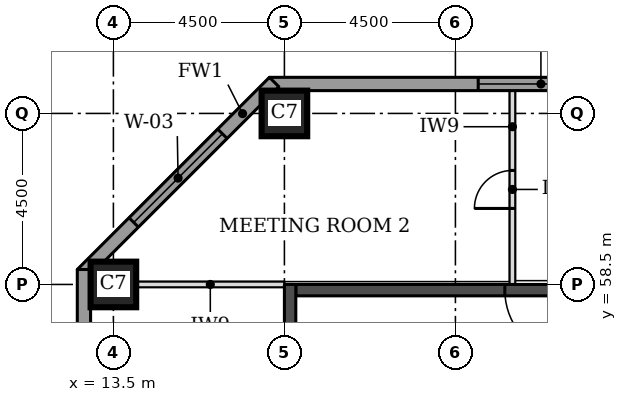
"""IFC4 building model, lengths in metres.
Left out: names, types, materials, properties, quantities, classifications, styles, units other than length and angle.
Written with IfcOpenShell. Run it as: python <this file> out.ifc"""

import sys

from ifc_helpers import new_model, si_unit, direction, frame, frame_2d, origin, origin_2d, place, context, subcontext, project, spatial, rectangle, extrude, element, fill, save


model = new_model("IFC4")
c1 = context("Model", 3, precision=1e-05, world=origin(), true_north=direction((0.0, 1.0)))
c2 = subcontext(c1, "Body", "Model", "MODEL_VIEW")
j1 = project(units=[si_unit("LENGTHUNIT", "METRE"), si_unit("PLANEANGLEUNIT", "RADIAN")], contexts=[c1])
p1 = place(None, origin())
s1 = spatial("IfcSite", under=j1, at=p1, CompositionType="ELEMENT")
p2 = place(p1, origin())
s2 = spatial("IfcBuilding", under=s1, at=p2, CompositionType="ELEMENT")
p3 = place(p2, frame((0.0, 0.0, 18.5)))
s3 = spatial("IfcBuildingStorey", under=s2, at=p3, CompositionType="ELEMENT", Elevation=18.5)
for number, where, z_axis, x_axis in (
    (1, (13.5, 58.5, 0.0), (0.0, 0.0, 1.0), (1.0, 0.0, 0.0)),
    (2, (18.0, 63.0, 0.0), (0.0, 0.0, 1.0), (1.0, 0.0, 0.0)),
):
    element("IfcColumn", number, at=place(p3, frame(where, z_axis=z_axis, x_axis=x_axis)), inside=s3, PredefinedType="COLUMN", context=c2, shape_type="SweptSolid", body=[
        extrude(rectangle(XDim=1.2, YDim=1.2, at=origin_2d()), origin(), (0.0, 0.0, 1.0), 4.6),
    ])
p4 = place(p3, frame((18.3, 58.35, 0.0), z_axis=(0.0, 0.0, 1.0), x_axis=(1.0, 0.0, 0.0)))
e3 = element("IfcWall", 3, at=p4, inside=s3, PredefinedType="SHEAR", context=c2, shape_type="SweptSolid", body=[
    extrude(rectangle(XDim=8.4, YDim=0.3, at=frame_2d((4.2, 0.0))), origin(), (0.0, 0.0, 1.0), 4.6),
])
p5 = place(p4, frame((5.5, 0.0, 0.0)))
e4 = element("IfcOpeningElement", 4, at=p5, cuts=e3, PredefinedType="OPENING", context=c2, shape_type="SweptSolid", body=[
    extrude(rectangle(XDim=1.8, YDim=2.1, at=frame_2d((0.9, 1.05))), frame((0.0, 0.16, 0.0), z_axis=(0.0, -1.0, 0.0), x_axis=(1.0, 0.0, 0.0)), (0.0, 0.0, 1.0), 0.32),
])
p6 = place(p3, frame((18.15, 49.5, 0.0), z_axis=(0.0, 0.0, 1.0), x_axis=(0.0, 1.0, 0.0)))
e5 = element("IfcWall", 5, at=p6, inside=s3, PredefinedType="SHEAR", context=c2, shape_type="SweptSolid", body=[
    extrude(rectangle(XDim=9.0, YDim=0.3, at=frame_2d((4.5, 0.0))), origin(), (0.0, 0.0, 1.0), 4.6),
])
p7 = place(p3, frame((35.4, 63.775, 0.0), z_axis=(0.0, 0.0, 1.0), x_axis=(-1.0, 0.0, 0.0)))
e6 = element("IfcWall", 6, at=p7, inside=s3, PredefinedType="STANDARD", context=c2, shape_type="SweptSolid", body=[
    extrude(rectangle(XDim=17.793, YDim=0.35, at=frame_2d((8.897, 0.0))), origin(), (0.0, 0.0, 1.0), 4.355),
])
p8 = place(p7, frame((0.5, 0.0, 0.9)))
e7 = element("IfcOpeningElement", 7, at=p8, cuts=e6, PredefinedType="OPENING", context=c2, shape_type="SweptSolid", body=[
    extrude(rectangle(XDim=3.3, YDim=2.7, at=frame_2d((1.65, 1.35))), frame((0.0, 0.185, 0.0), z_axis=(0.0, -1.0, 0.0), x_axis=(1.0, 0.0, 0.0)), (0.0, 0.0, 1.0), 0.37),
])
p9 = place(p7, frame((9.0, 0.0, 0.9)))
e8 = element("IfcOpeningElement", 8, at=p9, cuts=e6, PredefinedType="OPENING", context=c2, shape_type="SweptSolid", body=[
    extrude(rectangle(XDim=3.3, YDim=2.7, at=frame_2d((1.65, 1.35))), frame((0.0, 0.185, 0.0), z_axis=(0.0, -1.0, 0.0), x_axis=(1.0, 0.0, 0.0)), (0.0, 0.0, 1.0), 0.37),
])
p10 = place(p3, frame((17.73, 63.826, 0.0), z_axis=(0.0, 0.0, 1.0), x_axis=(-0.707106781187, -0.707106781187, 0.0)))
e9 = element("IfcWall", 9, at=p10, inside=s3, PredefinedType="STANDARD", context=c2, shape_type="SweptSolid", body=[
    extrude(rectangle(XDim=7.151, YDim=0.35, at=frame_2d((3.576, 0.0))), origin(), (0.0, 0.0, 1.0), 4.355),
])
p11 = place(p10, frame((1.926, 0.0, 0.9)))
e10 = element("IfcOpeningElement", 10, at=p11, cuts=e9, PredefinedType="OPENING", context=c2, shape_type="SweptSolid", body=[
    extrude(rectangle(XDim=3.3, YDim=2.7, at=frame_2d((1.65, 1.35))), frame((0.0, 0.185, 0.0), z_axis=(0.0, -1.0, 0.0), x_axis=(1.0, 0.0, 0.0)), (0.0, 0.0, 1.0), 0.37),
])
p12 = place(p3, frame((12.725, 58.894, 0.0), z_axis=(0.0, 0.0, 1.0), x_axis=(0.0, -1.0, 0.0)))
e11 = element("IfcWall", 11, at=p12, inside=s3, PredefinedType="STANDARD", context=c2, shape_type="SweptSolid", body=[
    extrude(rectangle(XDim=18.394, YDim=0.35, at=frame_2d((9.197, 0.0))), origin(), (0.0, 0.0, 1.0), 4.355),
])
p13 = place(p12, frame((5.493, 0.0, 0.9)))
e12 = element("IfcOpeningElement", 12, at=p13, cuts=e11, PredefinedType="OPENING", context=c2, shape_type="SweptSolid", body=[
    extrude(rectangle(XDim=3.3, YDim=2.7, at=frame_2d((1.65, 1.35))), frame((0.0, 0.185, 0.0), z_axis=(0.0, -1.0, 0.0), x_axis=(1.0, 0.0, 0.0)), (0.0, 0.0, 1.0), 0.37),
])
p14 = place(p12, frame((9.993, 0.0, 0.9)))
e13 = element("IfcOpeningElement", 13, at=p14, cuts=e11, PredefinedType="OPENING", context=c2, shape_type="SweptSolid", body=[
    extrude(rectangle(XDim=3.3, YDim=2.7, at=frame_2d((1.65, 1.35))), frame((0.0, 0.185, 0.0), z_axis=(0.0, -1.0, 0.0), x_axis=(1.0, 0.0, 0.0)), (0.0, 0.0, 1.0), 0.37),
])
p15 = place(p3, frame((14.1, 58.5, 0.0), z_axis=(0.0, 0.0, 1.0), x_axis=(1.0, 0.0, 0.0)))
e14 = element("IfcWall", 14, at=p15, inside=s3, PredefinedType="PARTITIONING", context=c2, shape_type="SweptSolid", body=[
    extrude(rectangle(XDim=3.9, YDim=0.15, at=frame_2d((1.95, 0.0))), origin(), (0.0, 0.0, 1.0), 4.38),
])
p16 = place(p3, frame((24.0, 58.5, 0.0), z_axis=(0.0, 0.0, 1.0), x_axis=(0.0, 1.0, 0.0)))
e15 = element("IfcWall", 15, at=p16, inside=s3, PredefinedType="PARTITIONING", context=c2, shape_type="SweptSolid", body=[
    extrude(rectangle(XDim=5.1, YDim=0.15, at=frame_2d((2.55, 0.0))), origin(), (0.0, 0.0, 1.0), 4.38),
])
p17 = place(p16, frame((2.0, 0.0, 0.0)))
e16 = element("IfcOpeningElement", 16, at=p17, cuts=e15, PredefinedType="OPENING", context=c2, shape_type="SweptSolid", body=[
    extrude(rectangle(XDim=1.0, YDim=2.1, at=frame_2d((0.5, 1.05))), frame((0.0, 0.085, 0.0), z_axis=(0.0, -1.0, 0.0), x_axis=(1.0, 0.0, 0.0)), (0.0, 0.0, 1.0), 0.17),
])
p18 = place(p9, origin())
e17 = element("IfcWindow", 17, at=p18, inside=s3, PartitioningType="SINGLE_PANEL", PredefinedType="WINDOW", context=c2, shape_type="SweptSolid", body=[
    extrude(rectangle(XDim=3.3, YDim=2.7, at=frame_2d((1.65, 1.35))), frame((0.0, 0.085, 0.0), z_axis=(0.0, -1.0, 0.0), x_axis=(1.0, 0.0, 0.0)), (0.0, 0.0, 1.0), 0.06),
])
fill(e8, e17)
p19 = place(p11, origin())
e18 = element("IfcWindow", 18, at=p19, inside=s3, PartitioningType="SINGLE_PANEL", PredefinedType="WINDOW", context=c2, shape_type="SweptSolid", body=[
    extrude(rectangle(XDim=3.3, YDim=2.7, at=frame_2d((1.65, 1.35))), frame((0.0, 0.085, 0.0), z_axis=(0.0, -1.0, 0.0), x_axis=(1.0, 0.0, 0.0)), (0.0, 0.0, 1.0), 0.06),
])
fill(e10, e18)
p20 = place(p17, origin())
e19 = element("IfcDoor", 19, at=p20, inside=s3, OperationType="SINGLE_SWING_LEFT", PredefinedType="DOOR", context=c2, shape_type="SweptSolid", body=[
    extrude(rectangle(XDim=1.0, YDim=2.1, at=frame_2d((0.5, 1.05))), frame((0.0, 0.025, 0.0), z_axis=(0.0, -1.0, 0.0), x_axis=(1.0, 0.0, 0.0)), (0.0, 0.0, 1.0), 0.05),
])
fill(e16, e19)
p21 = place(p5, frame((1.8, 0.0, 0.0), z_axis=(0.0, 0.0, 1.0), x_axis=(-1.0, 0.0, 0.0)))
e20 = element("IfcDoor", 20, at=p21, inside=s3, OperationType="SINGLE_SWING_LEFT", PredefinedType="DOOR", context=c2, shape_type="SweptSolid", body=[
    extrude(rectangle(XDim=1.8, YDim=2.1, at=frame_2d((0.9, 1.05))), frame((0.0, 0.025, 0.0), z_axis=(0.0, -1.0, 0.0), x_axis=(1.0, 0.0, 0.0)), (0.0, 0.0, 1.0), 0.05),
])
fill(e4, e20)
save(model, sys.argv[1])
